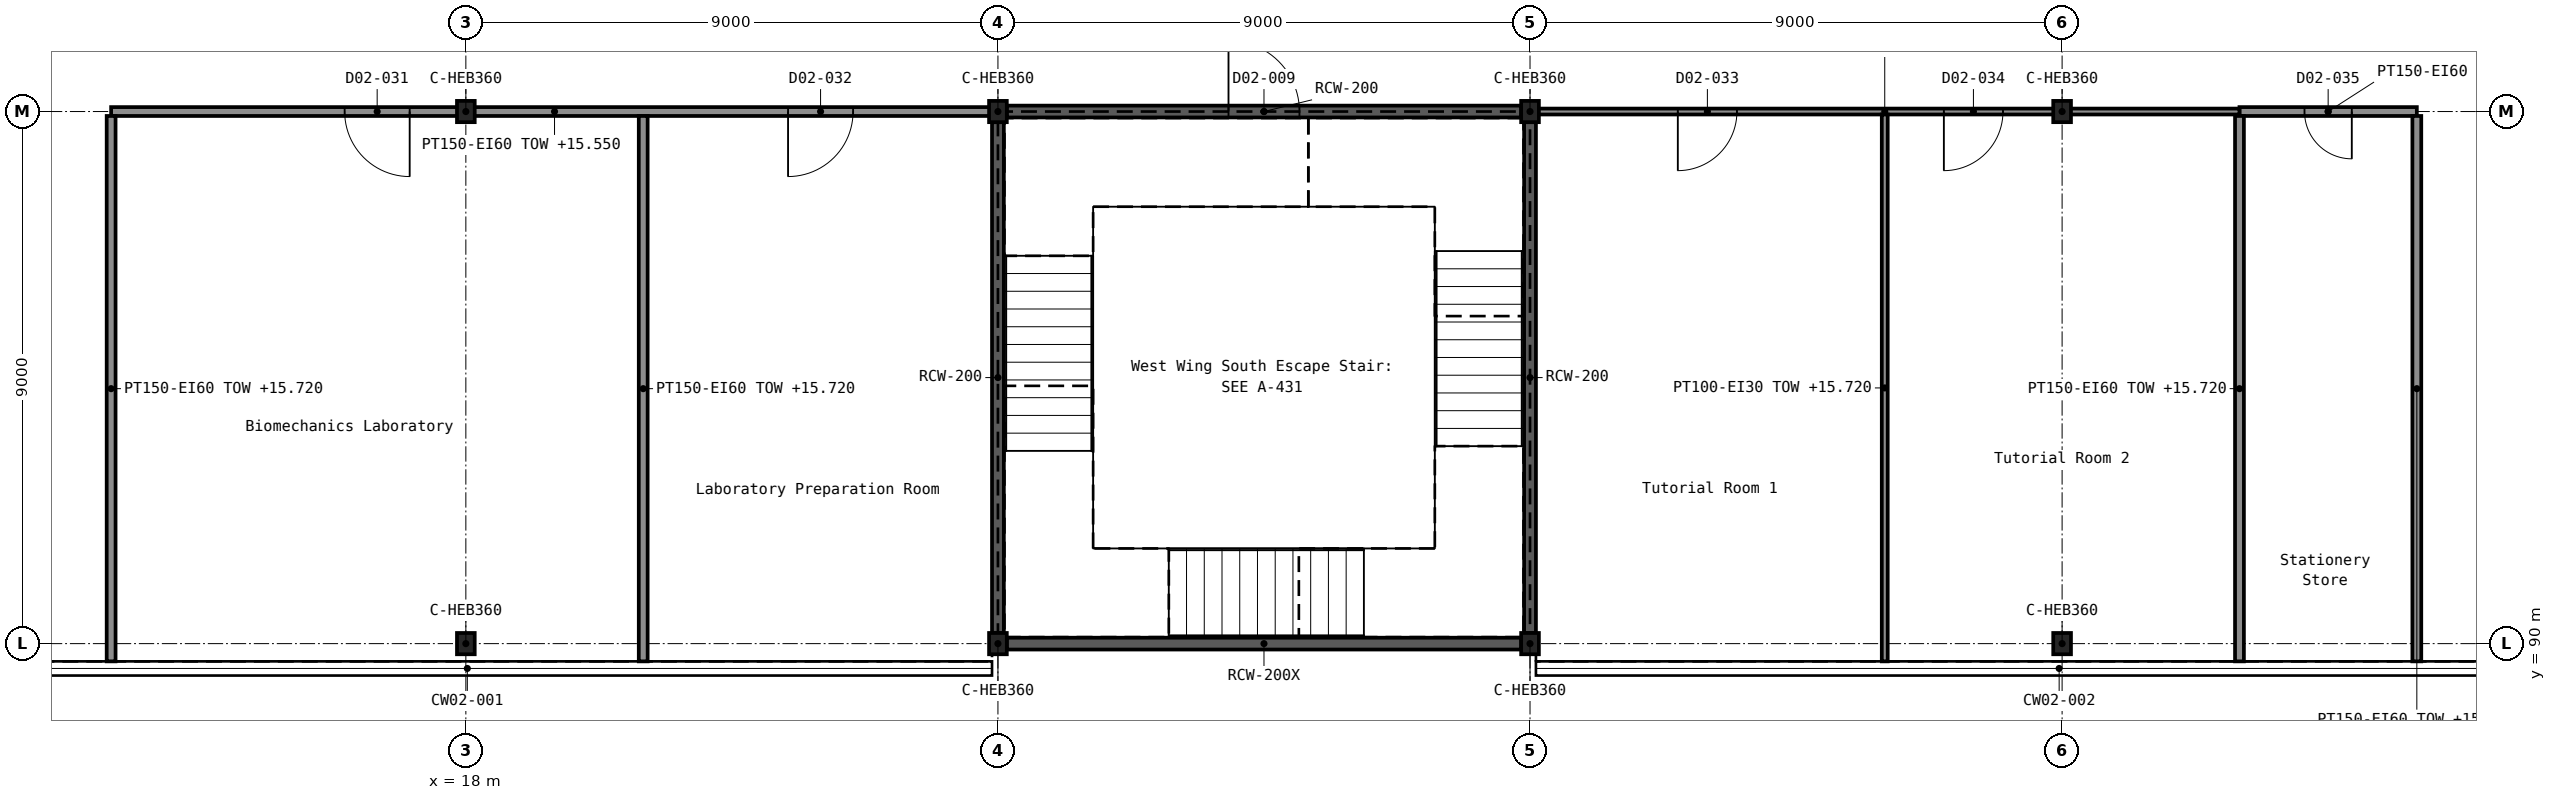
"""IFC4 building model, lengths in metres.
Left out: names, types, materials, properties, quantities, classifications, styles, units other than length and angle.
Written with IfcOpenShell. Run it as: python <this file> out.ifc"""

import sys

from ifc_helpers import new_model, si_unit, direction, frame, frame_2d, origin, origin_2d, place, context, subcontext, project, spatial, rectangle, i_section, extrude, element, fill, save


model = new_model("IFC4")
c1 = context("Model", 3, precision=1e-05, world=origin(), true_north=direction((0.0, 1.0)))
c2 = subcontext(c1, "Body", "Model", "MODEL_VIEW")
j1 = project(units=[si_unit("LENGTHUNIT", "METRE"), si_unit("PLANEANGLEUNIT", "RADIAN")], contexts=[c1])
p1 = place(None, origin())
s1 = spatial("IfcSite", under=j1, at=p1, CompositionType="ELEMENT")
p2 = place(p1, origin())
s2 = spatial("IfcBuilding", under=s1, at=p2, CompositionType="ELEMENT")
p3 = place(p2, frame((0.0, 0.0, 10.8)))
s3 = spatial("IfcBuildingStorey", under=s2, at=p3, CompositionType="ELEMENT", Elevation=10.8)
for number, where, z_axis, x_axis in (
    (1, (18.0, 90.0, 0.0), (0.0, 0.0, 1.0), (1.0, 0.0, 0.0)),
    (2, (27.0, 90.0, 0.0), (0.0, 0.0, 1.0), (1.0, 0.0, 0.0)),
    (3, (36.0, 90.0, 0.0), (0.0, 0.0, 1.0), (1.0, 0.0, 0.0)),
    (4, (45.0, 90.0, 0.0), (0.0, 0.0, 1.0), (1.0, 0.0, 0.0)),
    (5, (18.0, 99.0, 0.0), (0.0, 0.0, 1.0), (1.0, 0.0, 0.0)),
    (6, (27.0, 99.0, 0.0), (0.0, 0.0, 1.0), (1.0, 0.0, 0.0)),
    (7, (36.0, 99.0, 0.0), (0.0, 0.0, 1.0), (1.0, 0.0, 0.0)),
    (8, (45.0, 99.0, 0.0), (0.0, 0.0, 1.0), (1.0, 0.0, 0.0)),
):
    element("IfcColumn", number, at=place(p3, frame(where, z_axis=z_axis, x_axis=x_axis)), inside=s3, PredefinedType="COLUMN", context=c2, shape_type="SweptSolid", body=[
        extrude(i_section(OverallWidth=0.3, OverallDepth=0.36, WebThickness=0.012, FlangeThickness=0.022, FilletRadius=0.027, at=origin_2d()), origin(), (0.0, 0.0, 1.0), 5.4),
    ])
p4 = place(p3, frame((27.15, 90.0, 0.0), z_axis=(0.0, 0.0, 1.0), x_axis=(1.0, 0.0, 0.0)))
e9 = element("IfcWall", 9, at=p4, inside=s3, PredefinedType="SHEAR", context=c2, shape_type="SweptSolid", body=[
    extrude(rectangle(XDim=8.7, YDim=0.2, at=frame_2d((4.35, 0.0))), origin(), (0.0, 0.0, 1.0), 5.4),
])
p5 = place(p3, frame((27.15, 99.0, 0.0), z_axis=(0.0, 0.0, 1.0), x_axis=(1.0, 0.0, 0.0)))
e10 = element("IfcWall", 10, at=p5, inside=s3, PredefinedType="SHEAR", context=c2, shape_type="SweptSolid", body=[
    extrude(rectangle(XDim=8.7, YDim=0.2, at=frame_2d((4.35, 0.0))), origin(), (0.0, 0.0, 1.0), 5.4),
])
p6 = place(p5, frame((3.75, 0.0, 0.0)))
e11 = element("IfcOpeningElement", 11, at=p6, cuts=e10, PredefinedType="OPENING", context=c2, shape_type="SweptSolid", body=[
    extrude(rectangle(XDim=1.2, YDim=2.1, at=frame_2d((0.6, 1.05))), frame((0.0, 0.111, 0.0), z_axis=(0.0, -1.0, 0.0), x_axis=(1.0, 0.0, 0.0)), (0.0, 0.0, 1.0), 0.222),
])
for number, where, z_axis, x_axis in (
    (12, (27.0, 90.18, 0.0), (0.0, 0.0, 1.0), (0.0, 1.0, 0.0)),
    (13, (36.0, 90.18, 0.0), (0.0, 0.0, 1.0), (0.0, 1.0, 0.0)),
):
    element("IfcWall", number, at=place(p3, frame(where, z_axis=z_axis, x_axis=x_axis)), inside=s3, PredefinedType="SHEAR", context=c2, shape_type="SweptSolid", body=[
        extrude(rectangle(XDim=8.64, YDim=0.2, at=frame_2d((4.32, 0.0))), origin(), (0.0, 0.0, 1.0), 5.4),
    ])
p7 = place(p3, frame((12.0, 99.0, 0.0), z_axis=(0.0, 0.0, 1.0), x_axis=(1.0, 0.0, 0.0)))
e14 = element("IfcWall", 14, at=p7, inside=s3, PredefinedType="PARTITIONING", context=c2, shape_type="SweptSolid", body=[
    extrude(rectangle(XDim=15.0, YDim=0.15, at=frame_2d((7.5, 0.0))), origin(), (0.0, 0.0, 1.0), 4.75),
])
p8 = place(p7, frame((3.95, 0.0, 0.0)))
e15 = element("IfcOpeningElement", 15, at=p8, cuts=e14, PredefinedType="OPENING", context=c2, shape_type="SweptSolid", body=[
    extrude(rectangle(XDim=1.1, YDim=2.1, at=frame_2d((0.55, 1.05))), frame((0.0, 0.086, 0.0), z_axis=(0.0, -1.0, 0.0), x_axis=(1.0, 0.0, 0.0)), (0.0, 0.0, 1.0), 0.172),
])
p9 = place(p7, frame((11.45, 0.0, 0.0)))
e16 = element("IfcOpeningElement", 16, at=p9, cuts=e14, PredefinedType="OPENING", context=c2, shape_type="SweptSolid", body=[
    extrude(rectangle(XDim=1.1, YDim=2.4, at=frame_2d((0.55, 1.2))), frame((0.0, 0.086, 0.0), z_axis=(0.0, -1.0, 0.0), x_axis=(1.0, 0.0, 0.0)), (0.0, 0.0, 1.0), 0.172),
])
p10 = place(p3, frame((48.0, 99.0, 0.0), z_axis=(0.0, 0.0, 1.0), x_axis=(1.0, 0.0, 0.0)))
e17 = element("IfcWall", 17, at=p10, inside=s3, PredefinedType="PARTITIONING", context=c2, shape_type="SweptSolid", body=[
    extrude(rectangle(XDim=3.0, YDim=0.15, at=frame_2d((1.5, 0.0))), origin(), (0.0, 0.0, 1.0), 4.75),
])
p11 = place(p10, frame((1.1, 0.0, 0.0)))
e18 = element("IfcOpeningElement", 18, at=p11, cuts=e17, PredefinedType="OPENING", context=c2, shape_type="SweptSolid", body=[
    extrude(rectangle(XDim=0.8, YDim=2.1, at=frame_2d((0.4, 1.05))), frame((0.0, 0.086, 0.0), z_axis=(0.0, -1.0, 0.0), x_axis=(1.0, 0.0, 0.0)), (0.0, 0.0, 1.0), 0.172),
])
for number, where, z_axis, x_axis in (
    (19, (12.0, 89.7, 0.0), (0.0, 0.0, 1.0), (0.0, 1.0, 0.0)),
    (20, (21.0, 89.7, 0.0), (0.0, 0.0, 1.0), (0.0, 1.0, 0.0)),
    (21, (48.0, 89.7, 0.0), (0.0, 0.0, 1.0), (0.0, 1.0, 0.0)),
    (22, (51.0, 89.7, 0.0), (0.0, 0.0, 1.0), (0.0, 1.0, 0.0)),
):
    element("IfcWall", number, at=place(p3, frame(where, z_axis=z_axis, x_axis=x_axis)), inside=s3, PredefinedType="PARTITIONING", context=c2, shape_type="SweptSolid", body=[
        extrude(rectangle(XDim=9.225, YDim=0.15, at=frame_2d((4.613, 0.0))), origin(), (0.0, 0.0, 1.0), 4.92),
    ])
p12 = place(p3, frame((36.0, 99.0, 0.0), z_axis=(0.0, 0.0, 1.0), x_axis=(1.0, 0.0, 0.0)))
e23 = element("IfcWall", 23, at=p12, inside=s3, PredefinedType="PARTITIONING", context=c2, shape_type="SweptSolid", body=[
    extrude(rectangle(XDim=12.0, YDim=0.1, at=frame_2d((6.0, 0.0))), origin(), (0.0, 0.0, 1.0), 4.75),
])
p13 = place(p12, frame((2.5, 0.0, 0.0)))
e24 = element("IfcOpeningElement", 24, at=p13, cuts=e23, PredefinedType="OPENING", context=c2, shape_type="SweptSolid", body=[
    extrude(rectangle(XDim=1.0, YDim=2.1, at=frame_2d((0.5, 1.05))), frame((0.0, 0.061, 0.0), z_axis=(0.0, -1.0, 0.0), x_axis=(1.0, 0.0, 0.0)), (0.0, 0.0, 1.0), 0.122),
])
p14 = place(p12, frame((7.0, 0.0, 0.0)))
e25 = element("IfcOpeningElement", 25, at=p14, cuts=e23, PredefinedType="OPENING", context=c2, shape_type="SweptSolid", body=[
    extrude(rectangle(XDim=1.0, YDim=2.1, at=frame_2d((0.5, 1.05))), frame((0.0, 0.061, 0.0), z_axis=(0.0, -1.0, 0.0), x_axis=(1.0, 0.0, 0.0)), (0.0, 0.0, 1.0), 0.122),
])
p15 = place(p3, frame((42.0, 89.7, 0.0), z_axis=(0.0, 0.0, 1.0), x_axis=(0.0, 1.0, 0.0)))
e26 = element("IfcWall", 26, at=p15, inside=s3, PredefinedType="PARTITIONING", context=c2, shape_type="SweptSolid", body=[
    extrude(rectangle(XDim=9.25, YDim=0.1, at=frame_2d((4.625, 0.0))), origin(), (0.0, 0.0, 1.0), 4.92),
])
p16 = place(p6, origin())
e27 = element("IfcDoor", 27, at=p16, inside=s3, OperationType="SINGLE_SWING_LEFT", PredefinedType="DOOR", context=c2, shape_type="SweptSolid", body=[
    extrude(rectangle(XDim=1.2, YDim=2.1, at=frame_2d((0.6, 1.05))), frame((0.0, 0.025, 0.0), z_axis=(0.0, -1.0, 0.0), x_axis=(1.0, 0.0, 0.0)), (0.0, 0.0, 1.0), 0.05),
])
fill(e11, e27)
p17 = place(p8, frame((1.1, 0.0, 0.0), z_axis=(0.0, 0.0, 1.0), x_axis=(-1.0, 0.0, 0.0)))
e28 = element("IfcDoor", 28, at=p17, inside=s3, OperationType="SINGLE_SWING_LEFT", PredefinedType="DOOR", context=c2, shape_type="SweptSolid", body=[
    extrude(rectangle(XDim=1.1, YDim=2.1, at=frame_2d((0.55, 1.05))), frame((0.0, 0.025, 0.0), z_axis=(0.0, -1.0, 0.0), x_axis=(1.0, 0.0, 0.0)), (0.0, 0.0, 1.0), 0.05),
])
fill(e15, e28)
p18 = place(p9, frame((1.1, 0.0, 0.0), z_axis=(0.0, 0.0, 1.0), x_axis=(-1.0, 0.0, 0.0)))
e29 = element("IfcDoor", 29, at=p18, inside=s3, OperationType="SINGLE_SWING_RIGHT", PredefinedType="DOOR", context=c2, shape_type="SweptSolid", body=[
    extrude(rectangle(XDim=1.1, YDim=2.4, at=frame_2d((0.55, 1.2))), frame((0.0, 0.025, 0.0), z_axis=(0.0, -1.0, 0.0), x_axis=(1.0, 0.0, 0.0)), (0.0, 0.0, 1.0), 0.05),
])
fill(e16, e29)
p19 = place(p13, frame((1.0, 0.0, 0.0), z_axis=(0.0, 0.0, 1.0), x_axis=(-1.0, 0.0, 0.0)))
e30 = element("IfcDoor", 30, at=p19, inside=s3, OperationType="SINGLE_SWING_RIGHT", PredefinedType="DOOR", context=c2, shape_type="SweptSolid", body=[
    extrude(rectangle(XDim=1.0, YDim=2.1, at=frame_2d((0.5, 1.05))), frame((0.0, 0.025, 0.0), z_axis=(0.0, -1.0, 0.0), x_axis=(1.0, 0.0, 0.0)), (0.0, 0.0, 1.0), 0.05),
])
fill(e24, e30)
p20 = place(p14, frame((1.0, 0.0, 0.0), z_axis=(0.0, 0.0, 1.0), x_axis=(-1.0, 0.0, 0.0)))
e31 = element("IfcDoor", 31, at=p20, inside=s3, OperationType="SINGLE_SWING_RIGHT", PredefinedType="DOOR", context=c2, shape_type="SweptSolid", body=[
    extrude(rectangle(XDim=1.0, YDim=2.1, at=frame_2d((0.5, 1.05))), frame((0.0, 0.025, 0.0), z_axis=(0.0, -1.0, 0.0), x_axis=(1.0, 0.0, 0.0)), (0.0, 0.0, 1.0), 0.05),
])
fill(e25, e31)
p21 = place(p11, frame((0.8, 0.0, 0.0), z_axis=(0.0, 0.0, 1.0), x_axis=(-1.0, 0.0, 0.0)))
e32 = element("IfcDoor", 32, at=p21, inside=s3, OperationType="SINGLE_SWING_LEFT", PredefinedType="DOOR", context=c2, shape_type="SweptSolid", body=[
    extrude(rectangle(XDim=0.8, YDim=2.1, at=frame_2d((0.4, 1.05))), frame((0.0, 0.025, 0.0), z_axis=(0.0, -1.0, 0.0), x_axis=(1.0, 0.0, 0.0)), (0.0, 0.0, 1.0), 0.05),
])
fill(e18, e32)
save(model, sys.argv[1])
